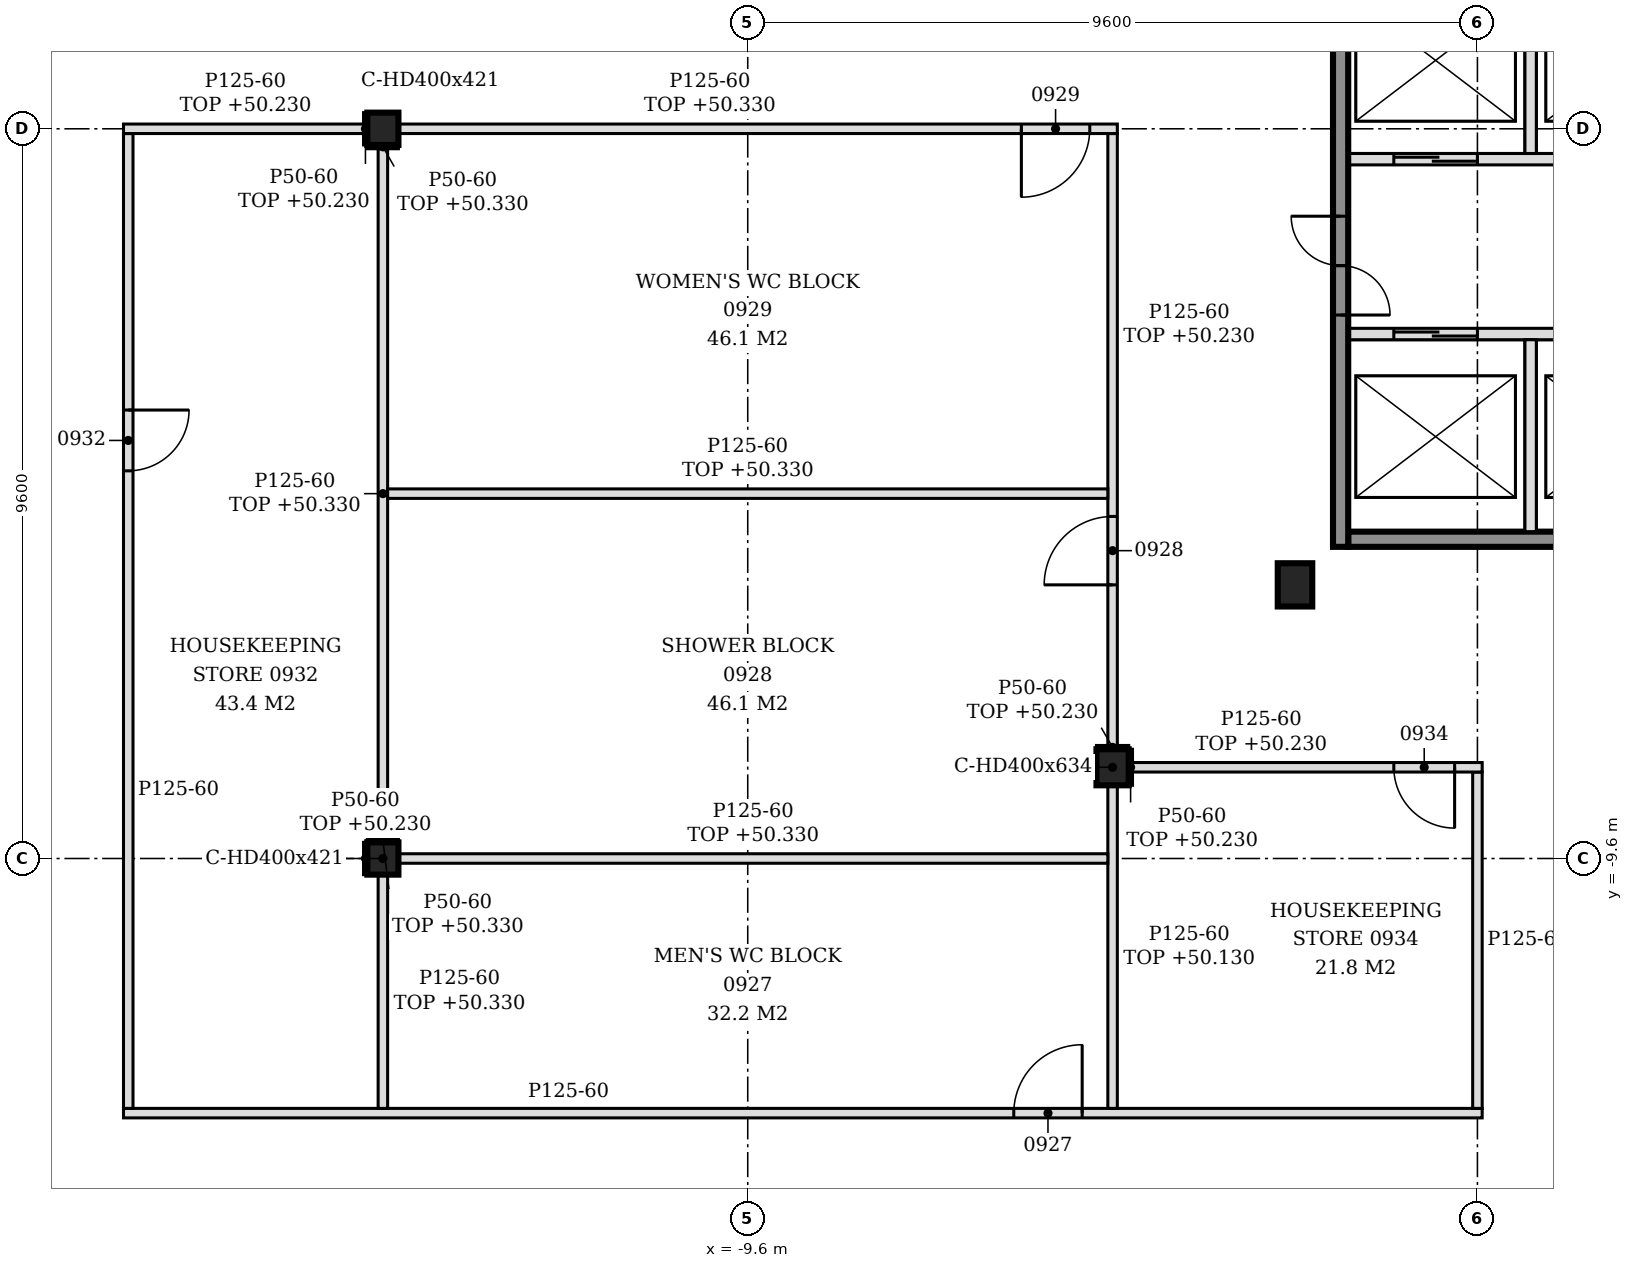
"""IFC4 building model, lengths in metres.
Left out: names, types, materials, properties, quantities, classifications, styles, units other than length and angle.
Written with IfcOpenShell. Run it as: python <this file> out.ifc"""

import sys

from ifc_helpers import new_model, si_unit, direction, frame, frame_2d, origin, origin_2d, place, context, subcontext, project, spatial, polyline, rectangle, i_section, outline, extrude, element, fill, save


model = new_model("IFC4")
c1 = context("Model", 3, precision=1e-05, world=origin(), true_north=direction((0.0, 1.0)))
c2 = subcontext(c1, "Body", "Model", "MODEL_VIEW")
j1 = project(units=[si_unit("LENGTHUNIT", "METRE"), si_unit("PLANEANGLEUNIT", "RADIAN")], contexts=[c1])
p1 = place(None, origin())
s1 = spatial("IfcSite", under=j1, at=p1, CompositionType="ELEMENT")
p2 = place(p1, origin())
s2 = spatial("IfcBuilding", under=s1, at=p2, CompositionType="ELEMENT")
p3 = place(p2, frame((0.0, 0.0, 47.4)))
s3 = spatial("IfcBuildingStorey", under=s2, at=p3, CompositionType="ELEMENT", Elevation=47.4)
p4 = place(p3, frame((-4.8, -8.4, -0.15), z_axis=(0.0, 0.0, 1.0), x_axis=(1.0, 0.0, 0.0)))
e1 = element("IfcColumn", 1, at=p4, inside=s3, PredefinedType="COLUMN", context=c2, shape_type="SweptSolid", body=[
    extrude(i_section(OverallWidth=0.424, OverallDepth=0.474, WebThickness=0.048, FlangeThickness=0.077, FilletRadius=0.015, at=origin_2d()), origin(), (0.0, 0.0, 1.0), 3.6),
])
p5 = place(p3, frame((-2.4, -6.0, -0.15), z_axis=(0.0, 0.0, 1.0), x_axis=(1.0, 0.0, 0.0)))
e2 = element("IfcColumn", 2, at=p5, inside=s3, PredefinedType="COLUMN", context=c2, shape_type="SweptSolid", body=[
    extrude(i_section(OverallWidth=0.454, OverallDepth=0.569, WebThickness=0.078, FlangeThickness=0.125, FilletRadius=0.015, at=origin_2d()), origin(), (0.0, 0.0, 1.0), 3.6),
])
for number, where, z_axis, x_axis in (
    (3, (-14.4, -9.6, -0.15), (0.0, 0.0, 1.0), (1.0, 0.0, 0.0)),
    (4, (-14.4, 0.0, -0.15), (0.0, 0.0, 1.0), (1.0, 0.0, 0.0)),
):
    element("IfcColumn", number, at=place(p3, frame(where, z_axis=z_axis, x_axis=x_axis)), inside=s3, PredefinedType="COLUMN", context=c2, shape_type="SweptSolid", body=[
        extrude(i_section(OverallWidth=0.409, OverallDepth=0.425, WebThickness=0.033, FlangeThickness=0.052, FilletRadius=0.015, at=origin_2d()), origin(), (0.0, 0.0, 1.0), 3.6),
    ])
p6 = place(p3, frame((-1.7, -5.4, 0.0), z_axis=(0.0, 0.0, 1.0), x_axis=(1.0, 0.0, 0.0)))
e5 = element("IfcWall", 5, at=p6, inside=s3, PredefinedType="SOLIDWALL", context=c2, shape_type="SweptSolid", body=[
    extrude(rectangle(XDim=7.9, YDim=0.2, at=frame_2d((3.95, 0.0))), origin(), (0.0, 0.0, 1.0), 3.45),
])
p7 = place(p3, frame((-1.7, -2.7, 0.0), z_axis=(0.0, 0.0, 1.0), x_axis=(1.0, 0.0, 0.0)))
e6 = element("IfcWall", 6, at=p7, inside=s3, PredefinedType="SOLIDWALL", context=c2, shape_type="SweptSolid", body=[
    extrude(rectangle(XDim=7.9, YDim=0.15, at=frame_2d((3.95, 0.0))), origin(), (0.0, 0.0, 1.0), 3.45),
])
p8 = place(p7, frame((0.6, 0.0, 0.0)))
e7 = element("IfcOpeningElement", 7, at=p8, cuts=e6, PredefinedType="OPENING", context=c2, shape_type="SweptSolid", body=[
    extrude(rectangle(XDim=1.1, YDim=2.1, at=frame_2d((0.55, 1.05))), frame((0.0, 0.085, 0.0), z_axis=(0.0, -1.0, 0.0), x_axis=(1.0, 0.0, 0.0)), (0.0, 0.0, 1.0), 0.17),
])
p9 = place(p7, frame((3.1, 0.0, 0.0)))
e8 = element("IfcOpeningElement", 8, at=p9, cuts=e6, PredefinedType="OPENING", context=c2, shape_type="SweptSolid", body=[
    extrude(rectangle(XDim=1.1, YDim=2.1, at=frame_2d((0.55, 1.05))), frame((0.0, 0.085, 0.0), z_axis=(0.0, -1.0, 0.0), x_axis=(1.0, 0.0, 0.0)), (0.0, 0.0, 1.0), 0.17),
])
p10 = place(p3, frame((-1.7, -0.4, 0.0), z_axis=(0.0, 0.0, 1.0), x_axis=(1.0, 0.0, 0.0)))
e9 = element("IfcWall", 9, at=p10, inside=s3, PredefinedType="SOLIDWALL", context=c2, shape_type="SweptSolid", body=[
    extrude(rectangle(XDim=15.925, YDim=0.15, at=frame_2d((7.962, 0.0))), origin(), (0.0, 0.0, 1.0), 3.45),
])
p11 = place(p10, frame((0.6, 0.0, 0.0)))
e10 = element("IfcOpeningElement", 10, at=p11, cuts=e9, PredefinedType="OPENING", context=c2, shape_type="SweptSolid", body=[
    extrude(rectangle(XDim=1.1, YDim=2.1, at=frame_2d((0.55, 1.05))), frame((0.0, 0.085, 0.0), z_axis=(0.0, -1.0, 0.0), x_axis=(1.0, 0.0, 0.0)), (0.0, 0.0, 1.0), 0.17),
])
p12 = place(p10, frame((3.1, 0.0, 0.0)))
e11 = element("IfcOpeningElement", 11, at=p12, cuts=e9, PredefinedType="OPENING", context=c2, shape_type="SweptSolid", body=[
    extrude(rectangle(XDim=1.1, YDim=2.1, at=frame_2d((0.55, 1.05))), frame((0.0, 0.085, 0.0), z_axis=(0.0, -1.0, 0.0), x_axis=(1.0, 0.0, 0.0)), (0.0, 0.0, 1.0), 0.17),
])
p13 = place(p10, frame((11.575, 0.0, 0.0)))
e12 = element("IfcOpeningElement", 12, at=p13, cuts=e9, PredefinedType="OPENING", context=c2, shape_type="SweptSolid", body=[
    extrude(rectangle(XDim=1.2, YDim=2.1, at=frame_2d((0.6, 1.05))), frame((0.0, 0.085, 0.0), z_axis=(0.0, -1.0, 0.0), x_axis=(1.0, 0.0, 0.0)), (0.0, 0.0, 1.0), 0.17),
])
p14 = place(p10, frame((14.125, 0.0, 0.0)))
e13 = element("IfcOpeningElement", 13, at=p14, cuts=e9, PredefinedType="OPENING", context=c2, shape_type="SweptSolid", body=[
    extrude(rectangle(XDim=1.2, YDim=2.1, at=frame_2d((0.6, 1.05))), frame((0.0, 0.085, 0.0), z_axis=(0.0, -1.0, 0.0), x_axis=(1.0, 0.0, 0.0)), (0.0, 0.0, 1.0), 0.17),
])
p15 = place(p3, frame((-1.8, -5.5, 0.0), z_axis=(0.0, 0.0, 1.0), x_axis=(0.0, 1.0, 0.0)))
e14 = element("IfcWall", 14, at=p15, inside=s3, PredefinedType="SOLIDWALL", context=c2, shape_type="SweptSolid", body=[
    extrude(rectangle(XDim=15.8, YDim=0.2, at=frame_2d((7.9, 0.0))), origin(), (0.0, 0.0, 1.0), 3.45),
])
p16 = place(p15, frame((3.05, 0.0, 0.0)))
e15 = element("IfcOpeningElement", 15, at=p16, cuts=e14, PredefinedType="OPENING", context=c2, shape_type="SweptSolid", body=[
    extrude(rectangle(XDim=1.3, YDim=2.1, at=frame_2d((0.65, 1.05))), frame((0.0, 0.11, 0.0), z_axis=(0.0, -1.0, 0.0), x_axis=(1.0, 0.0, 0.0)), (0.0, 0.0, 1.0), 0.22),
])
p17 = place(p15, frame((11.45, 0.0, 0.0)))
e16 = element("IfcOpeningElement", 16, at=p17, cuts=e14, PredefinedType="OPENING", context=c2, shape_type="SweptSolid", body=[
    extrude(rectangle(XDim=1.3, YDim=2.1, at=frame_2d((0.65, 1.05))), frame((0.0, 0.11, 0.0), z_axis=(0.0, -1.0, 0.0), x_axis=(1.0, 0.0, 0.0)), (0.0, 0.0, 1.0), 0.22),
])
p18 = place(p3, frame((0.7, -5.3, 0.0), z_axis=(0.0, 0.0, 1.0), x_axis=(0.0, 1.0, 0.0)))
e17 = element("IfcWall", 17, at=p18, inside=s3, PredefinedType="SOLIDWALL", context=c2, shape_type="SweptSolid", body=[
    extrude(rectangle(XDim=2.525, YDim=0.15, at=frame_2d((1.263, 0.0))), origin(), (0.0, 0.0, 1.0), 3.45),
])
p19 = place(p3, frame((0.7, -0.325, 0.0), z_axis=(0.0, 0.0, 1.0), x_axis=(0.0, 1.0, 0.0)))
e18 = element("IfcWall", 18, at=p19, inside=s3, PredefinedType="SOLIDWALL", context=c2, shape_type="SweptSolid", body=[
    extrude(rectangle(XDim=2.45, YDim=0.15, at=frame_2d((1.225, 0.0))), origin(), (0.0, 0.0, 1.0), 3.45),
])
p20 = place(p3, frame((-17.812, -12.95, 0.0), z_axis=(0.0, 0.0, 1.0), x_axis=(1.0, 0.0, 0.0)))
e19 = element("IfcWall", 19, at=p20, inside=s3, PredefinedType="PARTITIONING", context=c2, shape_type="SweptSolid", body=[
    extrude(outline(polyline([(0.0, 0.0), (17.875, 0.0), (17.875, 3.45), (13.163, 3.45), (13.16, 2.73), (12.863, 2.73), (12.861, 3.45), (3.562, 3.45), (3.561, 2.93), (3.262, 2.93), (3.26, 3.45), (0.0, 3.45), (0.0, 0.0)])), frame((0.0, 0.062, 0.0), z_axis=(0.0, -1.0, 0.0), x_axis=(1.0, 0.0, 0.0)), (0.0, 0.0, 1.0), 0.125),
])
p21 = place(p20, frame((11.712, 0.0, 0.0)))
e20 = element("IfcOpeningElement", 20, at=p21, cuts=e19, PredefinedType="OPENING", context=c2, shape_type="SweptSolid", body=[
    extrude(rectangle(XDim=0.9, YDim=2.1, at=frame_2d((0.45, 1.05))), frame((0.0, 0.073, 0.0), z_axis=(0.0, -1.0, 0.0), x_axis=(1.0, 0.0, 0.0)), (0.0, 0.0, 1.0), 0.145),
])
p22 = place(p3, frame((-17.75, -12.887, 0.0), z_axis=(0.0, 0.0, 1.0), x_axis=(0.0, 1.0, 0.0)))
e21 = element("IfcWall", 21, at=p22, inside=s3, PredefinedType="PARTITIONING", context=c2, shape_type="SweptSolid", body=[
    extrude(outline(polyline([(0.0, 0.0), (12.825, 0.0), (12.825, 2.83), (12.778, 2.83), (12.775, 3.45), (8.198, 3.45), (8.196, 2.83), (7.978, 2.83), (7.976, 3.45), (3.397, 3.45), (3.396, 2.83), (3.177, 2.83), (3.176, 3.45), (0.0, 3.45), (0.0, 0.0)])), frame((0.0, 0.062, 0.0), z_axis=(0.0, -1.0, 0.0), x_axis=(1.0, 0.0, 0.0)), (0.0, 0.0, 1.0), 0.125),
])
p23 = place(p22, frame((8.387, 0.0, 0.0)))
e22 = element("IfcOpeningElement", 22, at=p23, cuts=e21, PredefinedType="OPENING", context=c2, shape_type="SweptSolid", body=[
    extrude(rectangle(XDim=0.8, YDim=2.1, at=frame_2d((0.4, 1.05))), frame((0.0, 0.073, 0.0), z_axis=(0.0, -1.0, 0.0), x_axis=(1.0, 0.0, 0.0)), (0.0, 0.0, 1.0), 0.145),
])
p24 = place(p3, frame((-14.4, -12.887, 0.0), z_axis=(0.0, 0.0, 1.0), x_axis=(0.0, 1.0, 0.0)))
e23 = element("IfcWall", 23, at=p24, inside=s3, PredefinedType="PARTITIONING", context=c2, shape_type="SweptSolid", body=[
    extrude(rectangle(XDim=3.075, YDim=0.125, at=frame_2d((1.538, 0.0))), origin(), (0.0, 0.0, 1.0), 2.93),
])
p25 = place(p3, frame((-4.8, -12.887, 0.0), z_axis=(0.0, 0.0, 1.0), x_axis=(0.0, 1.0, 0.0)))
e24 = element("IfcWall", 24, at=p25, inside=s3, PredefinedType="PARTITIONING", context=c2, shape_type="SweptSolid", body=[
    extrude(rectangle(XDim=4.25, YDim=0.125, at=frame_2d((2.125, 0.0))), origin(), (0.0, 0.0, 1.0), 2.73),
])
p26 = place(p3, frame((0.0, -12.887, 0.0), z_axis=(0.0, 0.0, 1.0), x_axis=(0.0, 1.0, 0.0)))
e25 = element("IfcWall", 25, at=p26, inside=s3, PredefinedType="PARTITIONING", context=c2, shape_type="SweptSolid", body=[
    extrude(outline(polyline([(0.0, 0.0), (4.425, 0.0), (4.425, 2.83), (4.337, 2.83), (4.335, 3.45), (0.0, 3.45), (0.0, 0.0)])), frame((0.0, 0.062, 0.0), z_axis=(0.0, -1.0, 0.0), x_axis=(1.0, 0.0, 0.0)), (0.0, 0.0, 1.0), 0.125),
])
p27 = place(p3, frame((-14.196, -9.6, 0.0), z_axis=(0.0, 0.0, 1.0), x_axis=(1.0, 0.0, 0.0)))
e26 = element("IfcWall", 26, at=p27, inside=s3, PredefinedType="PARTITIONING", context=c2, shape_type="SweptSolid", body=[
    extrude(outline(polyline([(0.0, 0.0), (9.333, 0.0), (9.333, 2.73), (9.246, 2.73), (9.243, 2.93), (0.0, 2.93), (0.0, 0.0)])), frame((0.0, 0.062, 0.0), z_axis=(0.0, -1.0, 0.0), x_axis=(1.0, 0.0, 0.0)), (0.0, 0.0, 1.0), 0.125),
])
p28 = place(p3, frame((-14.4, -9.387, 0.0), z_axis=(0.0, 0.0, 1.0), x_axis=(0.0, 1.0, 0.0)))
e27 = element("IfcWall", 27, at=p28, inside=s3, PredefinedType="PARTITIONING", context=c2, shape_type="SweptSolid", body=[
    extrude(rectangle(XDim=9.175, YDim=0.125, at=frame_2d((4.587, 0.0))), origin(), (0.0, 0.0, 1.0), 2.93),
])
p29 = place(p3, frame((-4.588, -8.4, 0.0), z_axis=(0.0, 0.0, 1.0), x_axis=(1.0, 0.0, 0.0)))
e28 = element("IfcWall", 28, at=p29, inside=s3, PredefinedType="PARTITIONING", context=c2, shape_type="SweptSolid", body=[
    extrude(rectangle(XDim=4.65, YDim=0.125, at=frame_2d((2.325, 0.0))), origin(), (0.0, 0.0, 1.0), 2.83),
])
p30 = place(p29, frame((3.488, 0.0, 0.0)))
e29 = element("IfcOpeningElement", 29, at=p30, cuts=e28, PredefinedType="OPENING", context=c2, shape_type="SweptSolid", body=[
    extrude(rectangle(XDim=0.8, YDim=2.1, at=frame_2d((0.4, 1.05))), frame((0.0, 0.073, 0.0), z_axis=(0.0, -1.0, 0.0), x_axis=(1.0, 0.0, 0.0)), (0.0, 0.0, 1.0), 0.145),
])
p31 = place(p3, frame((-4.8, -8.163, 0.0), z_axis=(0.0, 0.0, 1.0), x_axis=(0.0, 1.0, 0.0)))
e30 = element("IfcWall", 30, at=p31, inside=s3, PredefinedType="PARTITIONING", context=c2, shape_type="SweptSolid", body=[
    extrude(rectangle(XDim=8.101, YDim=0.125, at=frame_2d((4.05, 0.0))), origin(), (0.0, 0.0, 1.0), 2.83),
])
p32 = place(p31, frame((2.163, 0.0, 0.0)))
e31 = element("IfcOpeningElement", 31, at=p32, cuts=e30, PredefinedType="OPENING", context=c2, shape_type="SweptSolid", body=[
    extrude(rectangle(XDim=0.9, YDim=2.1, at=frame_2d((0.45, 1.05))), frame((0.0, 0.073, 0.0), z_axis=(0.0, -1.0, 0.0), x_axis=(1.0, 0.0, 0.0)), (0.0, 0.0, 1.0), 0.145),
])
p33 = place(p3, frame((-14.337, -4.8, 0.0), z_axis=(0.0, 0.0, 1.0), x_axis=(1.0, 0.0, 0.0)))
e32 = element("IfcWall", 32, at=p33, inside=s3, PredefinedType="PARTITIONING", context=c2, shape_type="SweptSolid", body=[
    extrude(outline(polyline([(0.0, 0.0), (9.475, 0.0), (9.475, 2.83), (9.387, 2.83), (9.385, 2.93), (0.0, 2.93), (0.0, 0.0)])), frame((0.0, 0.062, 0.0), z_axis=(0.0, -1.0, 0.0), x_axis=(1.0, 0.0, 0.0)), (0.0, 0.0, 1.0), 0.125),
])
p34 = place(p3, frame((-17.812, 0.0, 0.0), z_axis=(0.0, 0.0, 1.0), x_axis=(1.0, 0.0, 0.0)))
e33 = element("IfcWall", 33, at=p34, inside=s3, PredefinedType="PARTITIONING", context=c2, shape_type="SweptSolid", body=[
    extrude(rectangle(XDim=3.208, YDim=0.125, at=frame_2d((1.604, 0.0))), origin(), (0.0, 0.0, 1.0), 2.83),
])
p35 = place(p3, frame((-14.196, 0.0, 0.0), z_axis=(0.0, 0.0, 1.0), x_axis=(1.0, 0.0, 0.0)))
e34 = element("IfcWall", 34, at=p35, inside=s3, PredefinedType="PARTITIONING", context=c2, shape_type="SweptSolid", body=[
    extrude(outline(polyline([(0.0, 0.0), (9.458, 0.0), (9.458, 2.83), (9.246, 2.83), (9.243, 2.93), (0.0, 2.93), (0.0, 0.0)])), frame((0.0, 0.062, 0.0), z_axis=(0.0, -1.0, 0.0), x_axis=(1.0, 0.0, 0.0)), (0.0, 0.0, 1.0), 0.125),
])
p36 = place(p35, frame((8.196, 0.0, 0.0)))
e35 = element("IfcOpeningElement", 35, at=p36, cuts=e34, PredefinedType="OPENING", context=c2, shape_type="SweptSolid", body=[
    extrude(rectangle(XDim=0.9, YDim=2.1, at=frame_2d((0.45, 1.05))), frame((0.0, 0.073, 0.0), z_axis=(0.0, -1.0, 0.0), x_axis=(1.0, 0.0, 0.0)), (0.0, 0.0, 1.0), 0.145),
])
p37 = place(p3, frame((-14.629, -9.812, 0.0), z_axis=(0.0, 0.0, 1.0), x_axis=(0.0, 1.0, 0.0)))
e36 = element("IfcWall", 36, at=p37, inside=s3, PredefinedType="PARTITIONING", context=c2, shape_type="SweptSolid", body=[
    extrude(rectangle(XDim=0.425, YDim=0.05, at=frame_2d((0.212, 0.0))), origin(), (0.0, 0.0, 1.0), 2.83),
])
p38 = place(p3, frame((-14.629, -0.212, 0.0), z_axis=(0.0, 0.0, 1.0), x_axis=(0.0, 1.0, 0.0)))
e37 = element("IfcWall", 37, at=p38, inside=s3, PredefinedType="PARTITIONING", context=c2, shape_type="SweptSolid", body=[
    extrude(rectangle(XDim=0.425, YDim=0.05, at=frame_2d((0.212, 0.0))), origin(), (0.0, 0.0, 1.0), 2.83),
])
p39 = place(p3, frame((-4.563, -8.637, 0.0), z_axis=(0.0, 0.0, 1.0), x_axis=(0.0, 1.0, 0.0)))
e38 = element("IfcWall", 38, at=p39, inside=s3, PredefinedType="PARTITIONING", context=c2, shape_type="SweptSolid", body=[
    extrude(rectangle(XDim=0.474, YDim=0.05, at=frame_2d((0.237, 0.0))), origin(), (0.0, 0.0, 1.0), 2.83),
])
p40 = place(p3, frame((-14.604, -9.363, 0.0), z_axis=(0.0, 0.0, 1.0), x_axis=(1.0, 0.0, 0.0)))
e39 = element("IfcWall", 39, at=p40, inside=s3, PredefinedType="PARTITIONING", context=c2, shape_type="SweptSolid", body=[
    extrude(rectangle(XDim=0.409, YDim=0.05, at=frame_2d((0.205, 0.0))), origin(), (0.0, 0.0, 1.0), 2.93),
])
p41 = place(p3, frame((-5.012, -8.138, 0.0), z_axis=(0.0, 0.0, 1.0), x_axis=(1.0, 0.0, 0.0)))
e40 = element("IfcWall", 40, at=p41, inside=s3, PredefinedType="PARTITIONING", context=c2, shape_type="SweptSolid", body=[
    extrude(rectangle(XDim=0.424, YDim=0.05, at=frame_2d((0.212, 0.0))), origin(), (0.0, 0.0, 1.0), 2.83),
])
p42 = place(p3, frame((-14.604, -0.238, 0.0), z_axis=(0.0, 0.0, 1.0), x_axis=(1.0, 0.0, 0.0)))
e41 = element("IfcWall", 41, at=p42, inside=s3, PredefinedType="PARTITIONING", context=c2, shape_type="SweptSolid", body=[
    extrude(rectangle(XDim=0.409, YDim=0.05, at=frame_2d((0.205, 0.0))), origin(), (0.0, 0.0, 1.0), 2.93),
])
p43 = place(p8, origin())
e42 = element("IfcDoor", 42, at=p43, inside=s3, OperationType="DOUBLE_DOOR_SLIDING", PredefinedType="DOOR", context=c2, shape_type="SweptSolid", body=[
    extrude(rectangle(XDim=1.1, YDim=2.1, at=frame_2d((0.55, 1.05))), frame((0.0, 0.025, 0.0), z_axis=(0.0, -1.0, 0.0), x_axis=(1.0, 0.0, 0.0)), (0.0, 0.0, 1.0), 0.05),
])
fill(e7, e42)
p44 = place(p11, origin())
e43 = element("IfcDoor", 43, at=p44, inside=s3, OperationType="DOUBLE_DOOR_SLIDING", PredefinedType="DOOR", context=c2, shape_type="SweptSolid", body=[
    extrude(rectangle(XDim=1.1, YDim=2.1, at=frame_2d((0.55, 1.05))), frame((0.0, 0.025, 0.0), z_axis=(0.0, -1.0, 0.0), x_axis=(1.0, 0.0, 0.0)), (0.0, 0.0, 1.0), 0.05),
])
fill(e10, e43)
p45 = place(p16, origin())
e44 = element("IfcDoor", 44, at=p45, inside=s3, OperationType="DOUBLE_DOOR_SINGLE_SWING", PredefinedType="DOOR", context=c2, shape_type="SweptSolid", body=[
    extrude(rectangle(XDim=1.3, YDim=2.1, at=frame_2d((0.65, 1.05))), frame((0.0, 0.025, 0.0), z_axis=(0.0, -1.0, 0.0), x_axis=(1.0, 0.0, 0.0)), (0.0, 0.0, 1.0), 0.05),
])
fill(e15, e44)
p46 = place(p21, origin())
e45 = element("IfcDoor", 45, at=p46, inside=s3, OperationType="SINGLE_SWING_RIGHT", PredefinedType="DOOR", context=c2, shape_type="SweptSolid", body=[
    extrude(rectangle(XDim=0.9, YDim=2.1, at=frame_2d((0.45, 1.05))), frame((0.0, 0.025, 0.0), z_axis=(0.0, -1.0, 0.0), x_axis=(1.0, 0.0, 0.0)), (0.0, 0.0, 1.0), 0.05),
])
fill(e20, e45)
p47 = place(p32, origin())
e46 = element("IfcDoor", 46, at=p47, inside=s3, OperationType="SINGLE_SWING_LEFT", PredefinedType="DOOR", context=c2, shape_type="SweptSolid", body=[
    extrude(rectangle(XDim=0.9, YDim=2.1, at=frame_2d((0.45, 1.05))), frame((0.0, 0.025, 0.0), z_axis=(0.0, -1.0, 0.0), x_axis=(1.0, 0.0, 0.0)), (0.0, 0.0, 1.0), 0.05),
])
fill(e31, e46)
p48 = place(p36, frame((0.9, 0.0, 0.0), z_axis=(0.0, 0.0, 1.0), x_axis=(-1.0, 0.0, 0.0)))
e47 = element("IfcDoor", 47, at=p48, inside=s3, OperationType="SINGLE_SWING_RIGHT", PredefinedType="DOOR", context=c2, shape_type="SweptSolid", body=[
    extrude(rectangle(XDim=0.9, YDim=2.1, at=frame_2d((0.45, 1.05))), frame((0.0, 0.025, 0.0), z_axis=(0.0, -1.0, 0.0), x_axis=(1.0, 0.0, 0.0)), (0.0, 0.0, 1.0), 0.05),
])
fill(e35, e47)
p49 = place(p23, frame((0.8, 0.0, 0.0), z_axis=(0.0, 0.0, 1.0), x_axis=(-1.0, 0.0, 0.0)))
e48 = element("IfcDoor", 48, at=p49, inside=s3, OperationType="SINGLE_SWING_LEFT", PredefinedType="DOOR", context=c2, shape_type="SweptSolid", body=[
    extrude(rectangle(XDim=0.8, YDim=2.1, at=frame_2d((0.4, 1.05))), frame((0.0, 0.025, 0.0), z_axis=(0.0, -1.0, 0.0), x_axis=(1.0, 0.0, 0.0)), (0.0, 0.0, 1.0), 0.05),
])
fill(e22, e48)
p50 = place(p30, frame((0.8, 0.0, 0.0), z_axis=(0.0, 0.0, 1.0), x_axis=(-1.0, 0.0, 0.0)))
e49 = element("IfcDoor", 49, at=p50, inside=s3, OperationType="SINGLE_SWING_LEFT", PredefinedType="DOOR", context=c2, shape_type="SweptSolid", body=[
    extrude(rectangle(XDim=0.8, YDim=2.1, at=frame_2d((0.4, 1.05))), frame((0.0, 0.025, 0.0), z_axis=(0.0, -1.0, 0.0), x_axis=(1.0, 0.0, 0.0)), (0.0, 0.0, 1.0), 0.05),
])
fill(e29, e49)
save(model, sys.argv[1])
